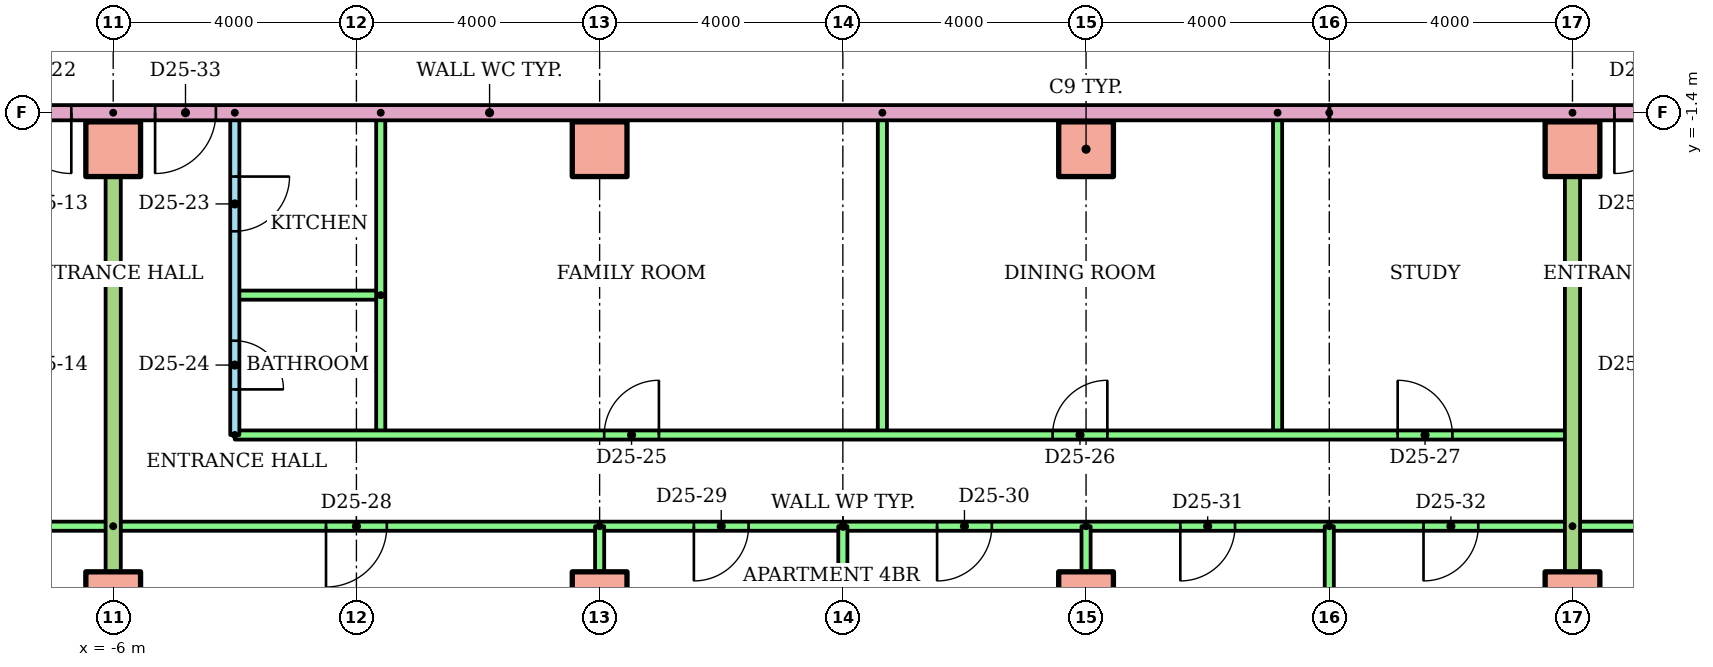
"""IFC4 building model, lengths in metres.
Left out: names, types, materials, properties, quantities, classifications, styles, units other than length and angle.
Written with IfcOpenShell. Run it as: python <this file> out.ifc"""

import sys

from ifc_helpers import new_model, si_unit, direction, frame, frame_2d, origin, origin_2d, place, context, subcontext, project, spatial, rectangle, extrude, element, fill, save


model = new_model("IFC4")
c1 = context("Model", 3, precision=1e-05, world=origin(), true_north=direction((0.0, 1.0)))
c2 = subcontext(c1, "Body", "Model", "MODEL_VIEW")
j1 = project(units=[si_unit("LENGTHUNIT", "METRE"), si_unit("PLANEANGLEUNIT", "RADIAN")], contexts=[c1])
p1 = place(None, origin())
s1 = spatial("IfcSite", under=j1, at=p1, CompositionType="ELEMENT")
p2 = place(p1, origin())
s2 = spatial("IfcBuilding", under=s1, at=p2, CompositionType="ELEMENT")
p3 = place(p2, frame((0.0, 0.0, 96.7)))
s3 = spatial("IfcBuildingStorey", under=s2, at=p3, CompositionType="ELEMENT", Elevation=96.7)
for number, where in (
    (1, (-6.0, -9.4, 0.0)),
    (2, (2.0, -9.4, 0.0)),
    (3, (10.0, -9.4, 0.0)),
    (4, (18.0, -9.4, 0.0)),
    (5, (-6.0, -2.0, 0.0)),
    (6, (2.0, -2.0, 0.0)),
    (7, (10.0, -2.0, 0.0)),
    (8, (18.0, -2.0, 0.0)),
):
    element("IfcColumn", number, at=place(p3, frame(where)), inside=s3, PredefinedType="COLUMN", context=c2, shape_type="SweptSolid", body=[
        extrude(rectangle(XDim=0.9, YDim=0.9, at=origin_2d()), origin(), (0.0, 0.0, 1.0), 3.2),
    ])
p4 = place(p3, frame((-6.0, -8.2, 0.0), z_axis=(0.0, 0.0, 1.0), x_axis=(-1.0, 0.0, 0.0)))
e9 = element("IfcWall", 9, at=p4, inside=s3, PredefinedType="PARTITIONING", context=c2, shape_type="SweptSolid", body=[
    extrude(rectangle(XDim=22.61, YDim=0.15, at=frame_2d((11.305, 0.0))), origin(), (0.0, 0.0, 1.0), 2.4),
])
p5 = place(p4, frame((19.7, 0.0, 0.0)))
e10 = element("IfcOpeningElement", 10, at=p5, cuts=e9, PredefinedType="OPENING", context=c2, shape_type="SweptSolid", body=[
    extrude(rectangle(XDim=0.9, YDim=2.1, at=frame_2d((0.45, 1.05))), frame((0.0, 0.085, 0.0), z_axis=(0.0, -1.0, 0.0), x_axis=(1.0, 0.0, 0.0)), (0.0, 0.0, 1.0), 0.17),
])
p6 = place(p4, frame((14.411, 0.0, 0.0)))
e11 = element("IfcOpeningElement", 11, at=p6, cuts=e9, PredefinedType="OPENING", context=c2, shape_type="SweptSolid", body=[
    extrude(rectangle(XDim=0.9, YDim=2.1, at=frame_2d((0.45, 1.05))), frame((0.0, 0.085, 0.0), z_axis=(0.0, -1.0, 0.0), x_axis=(1.0, 0.0, 0.0)), (0.0, 0.0, 1.0), 0.17),
])
p7 = place(p4, frame((9.55, 0.0, 0.0)))
e12 = element("IfcOpeningElement", 12, at=p7, cuts=e9, PredefinedType="OPENING", context=c2, shape_type="SweptSolid", body=[
    extrude(rectangle(XDim=0.9, YDim=2.1, at=frame_2d((0.45, 1.05))), frame((0.0, 0.085, 0.0), z_axis=(0.0, -1.0, 0.0), x_axis=(1.0, 0.0, 0.0)), (0.0, 0.0, 1.0), 0.17),
])
p8 = place(p4, frame((3.5, 0.0, 0.0)))
e13 = element("IfcOpeningElement", 13, at=p8, cuts=e9, PredefinedType="OPENING", context=c2, shape_type="SweptSolid", body=[
    extrude(rectangle(XDim=1.0, YDim=2.1, at=frame_2d((0.5, 1.05))), frame((0.0, 0.085, 0.0), z_axis=(0.0, -1.0, 0.0), x_axis=(1.0, 0.0, 0.0)), (0.0, 0.0, 1.0), 0.17),
])
p9 = place(p3, frame((-4.0, -1.4, 0.0), z_axis=(0.0, 0.0, 1.0), x_axis=(0.0, -1.0, 0.0)))
e14 = element("IfcWall", 14, at=p9, inside=s3, PredefinedType="PARTITIONING", context=c2, shape_type="SweptSolid", body=[
    extrude(rectangle(XDim=5.3, YDim=0.15, at=frame_2d((2.65, 0.0))), origin(), (0.0, 0.0, 1.0), 2.4),
])
p10 = place(p9, frame((1.05, 0.0, 0.0)))
e15 = element("IfcOpeningElement", 15, at=p10, cuts=e14, PredefinedType="OPENING", context=c2, shape_type="SweptSolid", body=[
    extrude(rectangle(XDim=0.9, YDim=2.1, at=frame_2d((0.45, 1.05))), frame((0.0, 0.085, 0.0), z_axis=(0.0, -1.0, 0.0), x_axis=(1.0, 0.0, 0.0)), (0.0, 0.0, 1.0), 0.17),
])
p11 = place(p9, frame((3.75, 0.0, 0.0)))
e16 = element("IfcOpeningElement", 16, at=p11, cuts=e14, PredefinedType="OPENING", context=c2, shape_type="SweptSolid", body=[
    extrude(rectangle(XDim=0.8, YDim=2.1, at=frame_2d((0.4, 1.05))), frame((0.0, 0.085, 0.0), z_axis=(0.0, -1.0, 0.0), x_axis=(1.0, 0.0, 0.0)), (0.0, 0.0, 1.0), 0.17),
])
p12 = place(p3, frame((-1.6, -4.4, 0.0), z_axis=(0.0, 0.0, 1.0), x_axis=(-1.0, 0.0, 0.0)))
e17 = element("IfcWall", 17, at=p12, inside=s3, PredefinedType="PARTITIONING", context=c2, shape_type="SweptSolid", body=[
    extrude(rectangle(XDim=2.4, YDim=0.15, at=frame_2d((1.2, 0.0))), origin(), (0.0, 0.0, 1.0), 2.4),
])
for number, where, z_axis, x_axis in (
    (18, (-1.6, -1.4, 0.0), (0.0, 0.0, 1.0), (0.0, -1.0, 0.0)),
    (19, (6.65, -1.4, 0.0), (0.0, 0.0, 1.0), (0.0, -1.0, 0.0)),
    (20, (13.15, -1.4, 0.0), (0.0, 0.0, 1.0), (0.0, -1.0, 0.0)),
):
    element("IfcWall", number, at=place(p3, frame(where, z_axis=z_axis, x_axis=x_axis)), inside=s3, PredefinedType="PARTITIONING", context=c2, shape_type="SweptSolid", body=[
        extrude(rectangle(XDim=5.3, YDim=0.15, at=frame_2d((2.65, 0.0))), origin(), (0.0, 0.0, 1.0), 2.4),
    ])
p13 = place(p3, frame((-4.0, -6.7, 0.0)))
e21 = element("IfcWall", 21, at=p13, inside=s3, PredefinedType="PARTITIONING", context=c2, shape_type="SweptSolid", body=[
    extrude(rectangle(XDim=22.0, YDim=0.15, at=frame_2d((11.0, 0.0))), origin(), (0.0, 0.0, 1.0), 2.4),
])
p14 = place(p13, frame((6.075, 0.0, 0.0)))
e22 = element("IfcOpeningElement", 22, at=p14, cuts=e21, PredefinedType="OPENING", context=c2, shape_type="SweptSolid", body=[
    extrude(rectangle(XDim=0.9, YDim=2.1, at=frame_2d((0.45, 1.05))), frame((0.0, 0.085, 0.0), z_axis=(0.0, -1.0, 0.0), x_axis=(1.0, 0.0, 0.0)), (0.0, 0.0, 1.0), 0.17),
])
p15 = place(p13, frame((13.45, 0.0, 0.0)))
e23 = element("IfcOpeningElement", 23, at=p15, cuts=e21, PredefinedType="OPENING", context=c2, shape_type="SweptSolid", body=[
    extrude(rectangle(XDim=0.9, YDim=2.1, at=frame_2d((0.45, 1.05))), frame((0.0, 0.085, 0.0), z_axis=(0.0, -1.0, 0.0), x_axis=(1.0, 0.0, 0.0)), (0.0, 0.0, 1.0), 0.17),
])
p16 = place(p13, frame((19.125, 0.0, 0.0)))
e24 = element("IfcOpeningElement", 24, at=p16, cuts=e21, PredefinedType="OPENING", context=c2, shape_type="SweptSolid", body=[
    extrude(rectangle(XDim=0.9, YDim=2.1, at=frame_2d((0.45, 1.05))), frame((0.0, 0.085, 0.0), z_axis=(0.0, -1.0, 0.0), x_axis=(1.0, 0.0, 0.0)), (0.0, 0.0, 1.0), 0.17),
])
p17 = place(p3, frame((18.0, -8.2, 0.0), z_axis=(0.0, 0.0, 1.0), x_axis=(-1.0, 0.0, 0.0)))
e25 = element("IfcWall", 25, at=p17, inside=s3, PredefinedType="PARTITIONING", context=c2, shape_type="SweptSolid", body=[
    extrude(rectangle(XDim=24.0, YDim=0.15, at=frame_2d((12.0, 0.0))), origin(), (0.0, 0.0, 1.0), 2.4),
])
p18 = place(p17, frame((19.5, 0.0, 0.0)))
e26 = element("IfcOpeningElement", 26, at=p18, cuts=e25, PredefinedType="OPENING", context=c2, shape_type="SweptSolid", body=[
    extrude(rectangle(XDim=1.0, YDim=2.1, at=frame_2d((0.5, 1.05))), frame((0.0, 0.085, 0.0), z_axis=(0.0, -1.0, 0.0), x_axis=(1.0, 0.0, 0.0)), (0.0, 0.0, 1.0), 0.17),
])
p19 = place(p17, frame((13.55, 0.0, 0.0)))
e27 = element("IfcOpeningElement", 27, at=p19, cuts=e25, PredefinedType="OPENING", context=c2, shape_type="SweptSolid", body=[
    extrude(rectangle(XDim=0.9, YDim=2.1, at=frame_2d((0.45, 1.05))), frame((0.0, 0.085, 0.0), z_axis=(0.0, -1.0, 0.0), x_axis=(1.0, 0.0, 0.0)), (0.0, 0.0, 1.0), 0.17),
])
p20 = place(p17, frame((9.55, 0.0, 0.0)))
e28 = element("IfcOpeningElement", 28, at=p20, cuts=e25, PredefinedType="OPENING", context=c2, shape_type="SweptSolid", body=[
    extrude(rectangle(XDim=0.9, YDim=2.1, at=frame_2d((0.45, 1.05))), frame((0.0, 0.085, 0.0), z_axis=(0.0, -1.0, 0.0), x_axis=(1.0, 0.0, 0.0)), (0.0, 0.0, 1.0), 0.17),
])
p21 = place(p17, frame((5.55, 0.0, 0.0)))
e29 = element("IfcOpeningElement", 29, at=p21, cuts=e25, PredefinedType="OPENING", context=c2, shape_type="SweptSolid", body=[
    extrude(rectangle(XDim=0.9, YDim=2.1, at=frame_2d((0.45, 1.05))), frame((0.0, 0.085, 0.0), z_axis=(0.0, -1.0, 0.0), x_axis=(1.0, 0.0, 0.0)), (0.0, 0.0, 1.0), 0.17),
])
p22 = place(p17, frame((1.55, 0.0, 0.0)))
e30 = element("IfcOpeningElement", 30, at=p22, cuts=e25, PredefinedType="OPENING", context=c2, shape_type="SweptSolid", body=[
    extrude(rectangle(XDim=0.9, YDim=2.1, at=frame_2d((0.45, 1.05))), frame((0.0, 0.085, 0.0), z_axis=(0.0, -1.0, 0.0), x_axis=(1.0, 0.0, 0.0)), (0.0, 0.0, 1.0), 0.17),
])
p23 = place(p3, frame((2.0, -8.2, 0.0), z_axis=(0.0, 0.0, 1.0), x_axis=(0.0, -1.0, 0.0)))
e31 = element("IfcWall", 31, at=p23, inside=s3, PredefinedType="PARTITIONING", context=c2, shape_type="SweptSolid", body=[
    extrude(rectangle(XDim=8.01, YDim=0.15, at=frame_2d((4.005, 0.0))), origin(), (0.0, 0.0, 1.0), 2.4),
])
p24 = place(p3, frame((6.0, -8.2, 0.0), z_axis=(0.0, 0.0, 1.0), x_axis=(0.0, -1.0, 0.0)))
e32 = element("IfcWall", 32, at=p24, inside=s3, PredefinedType="PARTITIONING", context=c2, shape_type="SweptSolid", body=[
    extrude(rectangle(XDim=8.021, YDim=0.15, at=frame_2d((4.01, 0.0))), origin(), (0.0, 0.0, 1.0), 2.4),
])
p25 = place(p3, frame((10.0, -8.2, 0.0), z_axis=(0.0, 0.0, 1.0), x_axis=(0.0, -1.0, 0.0)))
e33 = element("IfcWall", 33, at=p25, inside=s3, PredefinedType="PARTITIONING", context=c2, shape_type="SweptSolid", body=[
    extrude(rectangle(XDim=8.01, YDim=0.15, at=frame_2d((4.005, 0.0))), origin(), (0.0, 0.0, 1.0), 2.4),
])
p26 = place(p3, frame((14.0, -8.2, 0.0), z_axis=(0.0, 0.0, 1.0), x_axis=(0.0, -1.0, 0.0)))
e34 = element("IfcWall", 34, at=p26, inside=s3, PredefinedType="PARTITIONING", context=c2, shape_type="SweptSolid", body=[
    extrude(rectangle(XDim=8.021, YDim=0.15, at=frame_2d((4.01, 0.0))), origin(), (0.0, 0.0, 1.0), 2.4),
])
p27 = place(p3, frame((-6.0, -1.4, 0.0), z_axis=(0.0, 0.0, 1.0), x_axis=(0.0, -1.0, 0.0)))
e35 = element("IfcWall", 35, at=p27, inside=s3, PredefinedType="PARTITIONING", context=c2, shape_type="SweptSolid", body=[
    extrude(rectangle(XDim=14.81, YDim=0.25, at=frame_2d((7.405, 0.0))), origin(), (0.0, 0.0, 1.0), 2.4),
])
p28 = place(p3, frame((40.62, -8.2, 0.0), z_axis=(0.0, 0.0, 1.0), x_axis=(-1.0, 0.0, 0.0)))
e36 = element("IfcWall", 36, at=p28, inside=s3, PredefinedType="PARTITIONING", context=c2, shape_type="SweptSolid", body=[
    extrude(rectangle(XDim=22.62, YDim=0.15, at=frame_2d((11.31, 0.0))), origin(), (0.0, 0.0, 1.0), 2.4),
])
p29 = place(p28, frame((18.12, 0.0, 0.0)))
e37 = element("IfcOpeningElement", 37, at=p29, cuts=e36, PredefinedType="OPENING", context=c2, shape_type="SweptSolid", body=[
    extrude(rectangle(XDim=1.0, YDim=2.1, at=frame_2d((0.5, 1.05))), frame((0.0, 0.085, 0.0), z_axis=(0.0, -1.0, 0.0), x_axis=(1.0, 0.0, 0.0)), (0.0, 0.0, 1.0), 0.17),
])
p30 = place(p28, frame((12.17, 0.0, 0.0)))
e38 = element("IfcOpeningElement", 38, at=p30, cuts=e36, PredefinedType="OPENING", context=c2, shape_type="SweptSolid", body=[
    extrude(rectangle(XDim=0.9, YDim=2.1, at=frame_2d((0.45, 1.05))), frame((0.0, 0.085, 0.0), z_axis=(0.0, -1.0, 0.0), x_axis=(1.0, 0.0, 0.0)), (0.0, 0.0, 1.0), 0.17),
])
p31 = place(p28, frame((8.17, 0.0, 0.0)))
e39 = element("IfcOpeningElement", 39, at=p31, cuts=e36, PredefinedType="OPENING", context=c2, shape_type="SweptSolid", body=[
    extrude(rectangle(XDim=0.9, YDim=2.1, at=frame_2d((0.45, 1.05))), frame((0.0, 0.085, 0.0), z_axis=(0.0, -1.0, 0.0), x_axis=(1.0, 0.0, 0.0)), (0.0, 0.0, 1.0), 0.17),
])
p32 = place(p28, frame((2.97, 0.0, 0.0)))
e40 = element("IfcOpeningElement", 40, at=p32, cuts=e36, PredefinedType="OPENING", context=c2, shape_type="SweptSolid", body=[
    extrude(rectangle(XDim=0.9, YDim=2.1, at=frame_2d((0.45, 1.05))), frame((0.0, 0.085, 0.0), z_axis=(0.0, -1.0, 0.0), x_axis=(1.0, 0.0, 0.0)), (0.0, 0.0, 1.0), 0.17),
])
p33 = place(p3, frame((18.0, -1.4, 0.0), z_axis=(0.0, 0.0, 1.0), x_axis=(0.0, -1.0, 0.0)))
e41 = element("IfcWall", 41, at=p33, inside=s3, PredefinedType="PARTITIONING", context=c2, shape_type="SweptSolid", body=[
    extrude(rectangle(XDim=14.81, YDim=0.25, at=frame_2d((7.405, 0.0))), origin(), (0.0, 0.0, 1.0), 2.4),
])
p34 = place(p3, frame((29.0, -1.4, 0.0), z_axis=(0.0, 0.0, 1.0), x_axis=(-1.0, 0.0, 0.0)))
e42 = element("IfcWall", 42, at=p34, inside=s3, PredefinedType="PARTITIONING", context=c2, shape_type="SweptSolid", body=[
    extrude(rectangle(XDim=15.0, YDim=0.25, at=frame_2d((7.5, 0.0))), origin(), (0.0, 0.0, 1.0), 2.4),
])
p35 = place(p34, frame((9.311, 0.0, 0.0)))
e43 = element("IfcOpeningElement", 43, at=p35, cuts=e42, PredefinedType="OPENING", context=c2, shape_type="SweptSolid", body=[
    extrude(rectangle(XDim=1.0, YDim=2.1, at=frame_2d((0.5, 1.05))), frame((0.0, 0.135, 0.0), z_axis=(0.0, -1.0, 0.0), x_axis=(1.0, 0.0, 0.0)), (0.0, 0.0, 1.0), 0.27),
])
p36 = place(p3, frame((14.0, -1.4, 0.0), z_axis=(0.0, 0.0, 1.0), x_axis=(-1.0, 0.0, 0.0)))
e44 = element("IfcWall", 44, at=p36, inside=s3, PredefinedType="PARTITIONING", context=c2, shape_type="SweptSolid", body=[
    extrude(rectangle(XDim=28.0, YDim=0.25, at=frame_2d((14.0, 0.0))), origin(), (0.0, 0.0, 1.0), 2.4),
])
p37 = place(p36, frame((20.689, 0.0, 0.0)))
e45 = element("IfcOpeningElement", 45, at=p37, cuts=e44, PredefinedType="OPENING", context=c2, shape_type="SweptSolid", body=[
    extrude(rectangle(XDim=1.0, YDim=2.1, at=frame_2d((0.5, 1.05))), frame((0.0, 0.135, 0.0), z_axis=(0.0, -1.0, 0.0), x_axis=(1.0, 0.0, 0.0)), (0.0, 0.0, 1.0), 0.27),
])
p38 = place(p36, frame((18.311, 0.0, 0.0)))
e46 = element("IfcOpeningElement", 46, at=p38, cuts=e44, PredefinedType="OPENING", context=c2, shape_type="SweptSolid", body=[
    extrude(rectangle(XDim=1.0, YDim=2.1, at=frame_2d((0.5, 1.05))), frame((0.0, 0.135, 0.0), z_axis=(0.0, -1.0, 0.0), x_axis=(1.0, 0.0, 0.0)), (0.0, 0.0, 1.0), 0.27),
])
p39 = place(p37, origin())
e47 = element("IfcDoor", 47, at=p39, inside=s3, OperationType="SINGLE_SWING_LEFT", PredefinedType="DOOR", context=c2, shape_type="SweptSolid", body=[
    extrude(rectangle(XDim=1.0, YDim=2.1, at=frame_2d((0.5, 1.05))), frame((0.0, 0.025, 0.0), z_axis=(0.0, -1.0, 0.0), x_axis=(1.0, 0.0, 0.0)), (0.0, 0.0, 1.0), 0.05),
])
fill(e45, e47)
p40 = place(p10, origin())
e48 = element("IfcDoor", 48, at=p40, inside=s3, OperationType="SINGLE_SWING_LEFT", PredefinedType="DOOR", context=c2, shape_type="SweptSolid", body=[
    extrude(rectangle(XDim=0.9, YDim=2.1, at=frame_2d((0.45, 1.05))), frame((0.0, 0.025, 0.0), z_axis=(0.0, -1.0, 0.0), x_axis=(1.0, 0.0, 0.0)), (0.0, 0.0, 1.0), 0.05),
])
fill(e15, e48)
p41 = place(p11, origin())
e49 = element("IfcDoor", 49, at=p41, inside=s3, OperationType="SINGLE_SWING_RIGHT", PredefinedType="DOOR", context=c2, shape_type="SweptSolid", body=[
    extrude(rectangle(XDim=0.8, YDim=2.1, at=frame_2d((0.4, 1.05))), frame((0.0, 0.025, 0.0), z_axis=(0.0, -1.0, 0.0), x_axis=(1.0, 0.0, 0.0)), (0.0, 0.0, 1.0), 0.05),
])
fill(e16, e49)
p42 = place(p14, origin())
e50 = element("IfcDoor", 50, at=p42, inside=s3, OperationType="SINGLE_SWING_RIGHT", PredefinedType="DOOR", context=c2, shape_type="SweptSolid", body=[
    extrude(rectangle(XDim=0.9, YDim=2.1, at=frame_2d((0.45, 1.05))), frame((0.0, 0.025, 0.0), z_axis=(0.0, -1.0, 0.0), x_axis=(1.0, 0.0, 0.0)), (0.0, 0.0, 1.0), 0.05),
])
fill(e22, e50)
p43 = place(p15, origin())
e51 = element("IfcDoor", 51, at=p43, inside=s3, OperationType="SINGLE_SWING_RIGHT", PredefinedType="DOOR", context=c2, shape_type="SweptSolid", body=[
    extrude(rectangle(XDim=0.9, YDim=2.1, at=frame_2d((0.45, 1.05))), frame((0.0, 0.025, 0.0), z_axis=(0.0, -1.0, 0.0), x_axis=(1.0, 0.0, 0.0)), (0.0, 0.0, 1.0), 0.05),
])
fill(e23, e51)
p44 = place(p16, origin())
e52 = element("IfcDoor", 52, at=p44, inside=s3, OperationType="SINGLE_SWING_LEFT", PredefinedType="DOOR", context=c2, shape_type="SweptSolid", body=[
    extrude(rectangle(XDim=0.9, YDim=2.1, at=frame_2d((0.45, 1.05))), frame((0.0, 0.025, 0.0), z_axis=(0.0, -1.0, 0.0), x_axis=(1.0, 0.0, 0.0)), (0.0, 0.0, 1.0), 0.05),
])
fill(e24, e52)
p45 = place(p18, origin())
e53 = element("IfcDoor", 53, at=p45, inside=s3, OperationType="SINGLE_SWING_RIGHT", PredefinedType="DOOR", context=c2, shape_type="SweptSolid", body=[
    extrude(rectangle(XDim=1.0, YDim=2.1, at=frame_2d((0.5, 1.05))), frame((0.0, 0.025, 0.0), z_axis=(0.0, -1.0, 0.0), x_axis=(1.0, 0.0, 0.0)), (0.0, 0.0, 1.0), 0.05),
])
fill(e26, e53)
p46 = place(p19, origin())
e54 = element("IfcDoor", 54, at=p46, inside=s3, OperationType="SINGLE_SWING_RIGHT", PredefinedType="DOOR", context=c2, shape_type="SweptSolid", body=[
    extrude(rectangle(XDim=0.9, YDim=2.1, at=frame_2d((0.45, 1.05))), frame((0.0, 0.025, 0.0), z_axis=(0.0, -1.0, 0.0), x_axis=(1.0, 0.0, 0.0)), (0.0, 0.0, 1.0), 0.05),
])
fill(e27, e54)
p47 = place(p20, origin())
e55 = element("IfcDoor", 55, at=p47, inside=s3, OperationType="SINGLE_SWING_RIGHT", PredefinedType="DOOR", context=c2, shape_type="SweptSolid", body=[
    extrude(rectangle(XDim=0.9, YDim=2.1, at=frame_2d((0.45, 1.05))), frame((0.0, 0.025, 0.0), z_axis=(0.0, -1.0, 0.0), x_axis=(1.0, 0.0, 0.0)), (0.0, 0.0, 1.0), 0.05),
])
fill(e28, e55)
p48 = place(p21, origin())
e56 = element("IfcDoor", 56, at=p48, inside=s3, OperationType="SINGLE_SWING_RIGHT", PredefinedType="DOOR", context=c2, shape_type="SweptSolid", body=[
    extrude(rectangle(XDim=0.9, YDim=2.1, at=frame_2d((0.45, 1.05))), frame((0.0, 0.025, 0.0), z_axis=(0.0, -1.0, 0.0), x_axis=(1.0, 0.0, 0.0)), (0.0, 0.0, 1.0), 0.05),
])
fill(e29, e56)
p49 = place(p22, origin())
e57 = element("IfcDoor", 57, at=p49, inside=s3, OperationType="SINGLE_SWING_RIGHT", PredefinedType="DOOR", context=c2, shape_type="SweptSolid", body=[
    extrude(rectangle(XDim=0.9, YDim=2.1, at=frame_2d((0.45, 1.05))), frame((0.0, 0.025, 0.0), z_axis=(0.0, -1.0, 0.0), x_axis=(1.0, 0.0, 0.0)), (0.0, 0.0, 1.0), 0.05),
])
fill(e30, e57)
p50 = place(p38, origin())
e58 = element("IfcDoor", 58, at=p50, inside=s3, OperationType="SINGLE_SWING_RIGHT", PredefinedType="DOOR", context=c2, shape_type="SweptSolid", body=[
    extrude(rectangle(XDim=1.0, YDim=2.1, at=frame_2d((0.5, 1.05))), frame((0.0, 0.025, 0.0), z_axis=(0.0, -1.0, 0.0), x_axis=(1.0, 0.0, 0.0)), (0.0, 0.0, 1.0), 0.05),
])
fill(e46, e58)
p51 = place(p35, origin())
e59 = element("IfcDoor", 59, at=p51, inside=s3, OperationType="SINGLE_SWING_RIGHT", PredefinedType="DOOR", context=c2, shape_type="SweptSolid", body=[
    extrude(rectangle(XDim=1.0, YDim=2.1, at=frame_2d((0.5, 1.05))), frame((0.0, 0.025, 0.0), z_axis=(0.0, -1.0, 0.0), x_axis=(1.0, 0.0, 0.0)), (0.0, 0.0, 1.0), 0.05),
])
fill(e43, e59)
save(model, sys.argv[1])
